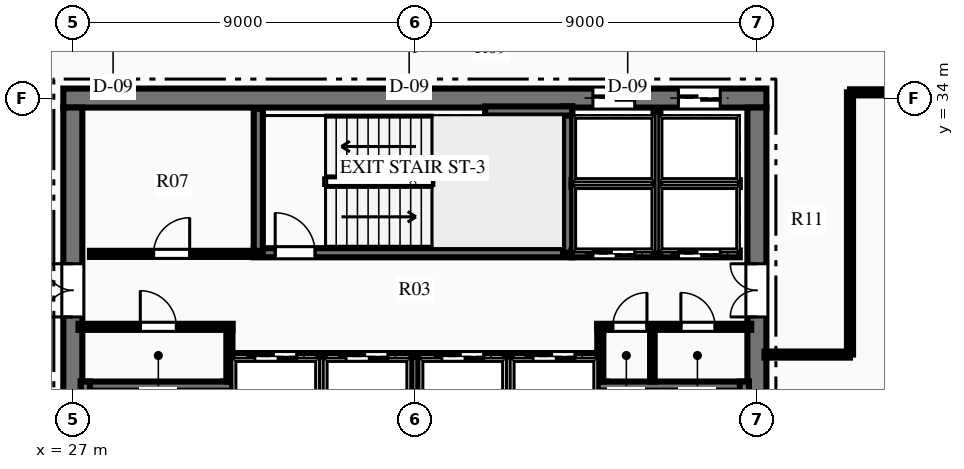
"""IFC4 building model, lengths in metres.
Left out: names, types, materials, properties, quantities, classifications, styles, units other than length and angle.
Written with IfcOpenShell. Run it as: python <this file> out.ifc"""

import sys

from ifc_helpers import new_model, si_unit, direction, frame, frame_2d, origin, place, context, subcontext, project, spatial, rectangle, extrude, element, fill, save


model = new_model("IFC4")
c1 = context("Model", 3, precision=1e-05, world=origin(), true_north=direction((0.0, 1.0)))
c2 = subcontext(c1, "Body", "Model", "MODEL_VIEW")
j1 = project(units=[si_unit("LENGTHUNIT", "METRE"), si_unit("PLANEANGLEUNIT", "RADIAN")], contexts=[c1])
p1 = place(None, origin())
s1 = spatial("IfcSite", under=j1, at=p1, CompositionType="ELEMENT")
p2 = place(p1, origin())
s2 = spatial("IfcBuilding", under=s1, at=p2, CompositionType="ELEMENT")
p3 = place(p2, frame((0.0, 0.0, 217.2)))
s3 = spatial("IfcBuildingStorey", under=s2, at=p3, CompositionType="ELEMENT", Elevation=217.2)
p4 = place(p3, frame((26.75, 34.0, 0.0), z_axis=(0.0, 0.0, 1.0), x_axis=(1.0, 0.0, 0.0)))
e1 = element("IfcWall", 1, at=p4, inside=s3, PredefinedType="SHEAR", context=c2, shape_type="SweptSolid", body=[
    extrude(rectangle(XDim=18.5, YDim=0.5, at=frame_2d((9.25, 0.0))), origin(), (0.0, 0.0, 1.0), 3.75),
])
p5 = place(p4, frame((13.935, 0.0, 0.0)))
e2 = element("IfcOpeningElement", 2, at=p5, cuts=e1, PredefinedType="OPENING", context=c2, shape_type="SweptSolid", body=[
    extrude(rectangle(XDim=1.1, YDim=2.15, at=frame_2d((0.55, 1.075))), frame((0.0, 0.26, 0.0), z_axis=(0.0, -1.0, 0.0), x_axis=(1.0, 0.0, 0.0)), (0.0, 0.0, 1.0), 0.52),
])
p6 = place(p4, frame((16.185, 0.0, 0.0)))
e3 = element("IfcOpeningElement", 3, at=p6, cuts=e1, PredefinedType="OPENING", context=c2, shape_type="SweptSolid", body=[
    extrude(rectangle(XDim=1.1, YDim=2.15, at=frame_2d((0.55, 1.075))), frame((0.0, 0.26, 0.0), z_axis=(0.0, -1.0, 0.0), x_axis=(1.0, 0.0, 0.0)), (0.0, 0.0, 1.0), 0.52),
])
p7 = place(p3, frame((27.0, 18.25, 0.0), z_axis=(0.0, 0.0, 1.0), x_axis=(0.0, 1.0, 0.0)))
e4 = element("IfcWall", 4, at=p7, inside=s3, PredefinedType="SHEAR", context=c2, shape_type="SweptSolid", body=[
    extrude(rectangle(XDim=15.5, YDim=0.5, at=frame_2d((7.75, 0.0))), origin(), (0.0, 0.0, 1.0), 3.75),
])
p8 = place(p7, frame((9.99, 0.0, 0.0)))
e5 = element("IfcOpeningElement", 5, at=p8, cuts=e4, PredefinedType="OPENING", context=c2, shape_type="SweptSolid", body=[
    extrude(rectangle(XDim=1.4, YDim=2.2, at=frame_2d((0.7, 1.1))), frame((0.0, 0.26, 0.0), z_axis=(0.0, -1.0, 0.0), x_axis=(1.0, 0.0, 0.0)), (0.0, 0.0, 1.0), 0.52),
])
p9 = place(p3, frame((45.0, 18.25, 0.0), z_axis=(0.0, 0.0, 1.0), x_axis=(0.0, 1.0, 0.0)))
e6 = element("IfcWall", 6, at=p9, inside=s3, PredefinedType="SHEAR", context=c2, shape_type="SweptSolid", body=[
    extrude(rectangle(XDim=15.5, YDim=0.5, at=frame_2d((7.75, 0.0))), origin(), (0.0, 0.0, 1.0), 3.75),
])
p10 = place(p9, frame((9.99, 0.0, 0.0)))
e7 = element("IfcOpeningElement", 7, at=p10, cuts=e6, PredefinedType="OPENING", context=c2, shape_type="SweptSolid", body=[
    extrude(rectangle(XDim=1.4, YDim=2.2, at=frame_2d((0.7, 1.1))), frame((0.0, 0.26, 0.0), z_axis=(0.0, -1.0, 0.0), x_axis=(1.0, 0.0, 0.0)), (0.0, 0.0, 1.0), 0.52),
])
p11 = place(p3, frame((31.07, 18.28, 0.0), z_axis=(0.0, 0.0, 1.0), x_axis=(0.0, 1.0, 0.0)))
e8 = element("IfcWall", 8, at=p11, inside=s3, PredefinedType="SHEAR", context=c2, shape_type="SweptSolid", body=[
    extrude(rectangle(XDim=8.26, YDim=0.24, at=frame_2d((4.13, 0.0))), origin(), (0.0, 0.0, 1.0), 3.75),
])
p12 = place(p11, frame((0.365, 0.0, 0.0)))
e9 = element("IfcOpeningElement", 9, at=p12, cuts=e8, PredefinedType="OPENING", context=c2, shape_type="SweptSolid", body=[
    extrude(rectangle(XDim=1.05, YDim=2.15, at=frame_2d((0.525, 1.075))), frame((0.0, 0.13, 0.0), z_axis=(0.0, -1.0, 0.0), x_axis=(1.0, 0.0, 0.0)), (0.0, 0.0, 1.0), 0.26),
])
p13 = place(p3, frame((27.21, 26.42, 0.0), z_axis=(0.0, 0.0, 1.0), x_axis=(1.0, 0.0, 0.0)))
e10 = element("IfcWall", 10, at=p13, inside=s3, PredefinedType="SHEAR", context=c2, shape_type="SweptSolid", body=[
    extrude(rectangle(XDim=3.98, YDim=0.24, at=frame_2d((1.99, 0.0))), origin(), (0.0, 0.0, 1.0), 3.75),
])
p14 = place(p3, frame((27.33, 18.28, 0.0), z_axis=(0.0, 0.0, 1.0), x_axis=(0.0, 1.0, 0.0)))
e11 = element("IfcWall", 11, at=p14, inside=s3, PredefinedType="SHEAR", context=c2, shape_type="SweptSolid", body=[
    extrude(rectangle(XDim=8.26, YDim=0.24, at=frame_2d((4.13, 0.0))), origin(), (0.0, 0.0, 1.0), 3.75),
])
p15 = place(p3, frame((40.93, 18.28, 0.0), z_axis=(0.0, 0.0, 1.0), x_axis=(0.0, 1.0, 0.0)))
e12 = element("IfcWall", 12, at=p15, inside=s3, PredefinedType="SHEAR", context=c2, shape_type="SweptSolid", body=[
    extrude(rectangle(XDim=8.26, YDim=0.24, at=frame_2d((4.13, 0.0))), origin(), (0.0, 0.0, 1.0), 3.75),
])
p16 = place(p15, frame((0.365, 0.0, 0.0)))
e13 = element("IfcOpeningElement", 13, at=p16, cuts=e12, PredefinedType="OPENING", context=c2, shape_type="SweptSolid", body=[
    extrude(rectangle(XDim=1.05, YDim=2.15, at=frame_2d((0.525, 1.075))), frame((0.0, 0.13, 0.0), z_axis=(0.0, -1.0, 0.0), x_axis=(1.0, 0.0, 0.0)), (0.0, 0.0, 1.0), 0.26),
])
p17 = place(p3, frame((40.81, 26.42, 0.0), z_axis=(0.0, 0.0, 1.0), x_axis=(1.0, 0.0, 0.0)))
e14 = element("IfcWall", 14, at=p17, inside=s3, PredefinedType="SHEAR", context=c2, shape_type="SweptSolid", body=[
    extrude(rectangle(XDim=3.98, YDim=0.24, at=frame_2d((1.99, 0.0))), origin(), (0.0, 0.0, 1.0), 3.75),
])
p18 = place(p3, frame((44.67, 18.28, 0.0), z_axis=(0.0, 0.0, 1.0), x_axis=(0.0, 1.0, 0.0)))
e15 = element("IfcWall", 15, at=p18, inside=s3, PredefinedType="SHEAR", context=c2, shape_type="SweptSolid", body=[
    extrude(rectangle(XDim=8.26, YDim=0.24, at=frame_2d((4.13, 0.0))), origin(), (0.0, 0.0, 1.0), 3.75),
])
p19 = place(p3, frame((31.76, 29.93, 0.0), z_axis=(0.0, 0.0, 1.0), x_axis=(1.0, 0.0, 0.0)))
e16 = element("IfcWall", 16, at=p19, inside=s3, PredefinedType="SHEAR", context=c2, shape_type="SweptSolid", body=[
    extrude(rectangle(XDim=8.38, YDim=0.24, at=frame_2d((4.19, 0.0))), origin(), (0.0, 0.0, 1.0), 3.75),
])
p20 = place(p19, frame((0.565, 0.0, 0.0)))
e17 = element("IfcOpeningElement", 17, at=p20, cuts=e16, PredefinedType="OPENING", context=c2, shape_type="SweptSolid", body=[
    extrude(rectangle(XDim=1.05, YDim=2.15, at=frame_2d((0.525, 1.075))), frame((0.0, 0.13, 0.0), z_axis=(0.0, -1.0, 0.0), x_axis=(1.0, 0.0, 0.0)), (0.0, 0.0, 1.0), 0.26),
])
p21 = place(p3, frame((31.88, 29.93, 0.0), z_axis=(0.0, 0.0, 1.0), x_axis=(0.0, 1.0, 0.0)))
e18 = element("IfcWall", 18, at=p21, inside=s3, PredefinedType="SHEAR", context=c2, shape_type="SweptSolid", body=[
    extrude(rectangle(XDim=3.79, YDim=0.24, at=frame_2d((1.895, 0.0))), origin(), (0.0, 0.0, 1.0), 3.75),
])
p22 = place(p3, frame((40.02, 29.93, 0.0), z_axis=(0.0, 0.0, 1.0), x_axis=(0.0, 1.0, 0.0)))
e19 = element("IfcWall", 19, at=p22, inside=s3, PredefinedType="SHEAR", context=c2, shape_type="SweptSolid", body=[
    extrude(rectangle(XDim=3.85, YDim=0.24, at=frame_2d((1.925, 0.0))), origin(), (0.0, 0.0, 1.0), 3.75),
])
p23 = place(p3, frame((37.85, 33.66, 0.0), z_axis=(0.0, 0.0, 1.0), x_axis=(1.0, 0.0, 0.0)))
e20 = element("IfcWall", 20, at=p23, inside=s3, PredefinedType="SHEAR", context=c2, shape_type="SweptSolid", body=[
    extrude(rectangle(XDim=2.29, YDim=0.24, at=frame_2d((1.145, 0.0))), origin(), (0.0, 0.0, 1.0), 3.75),
])
p24 = place(p3, frame((27.15, 27.98, 0.0), z_axis=(0.0, 0.0, 1.0), x_axis=(1.0, 0.0, 0.0)))
e21 = element("IfcWall", 21, at=p24, inside=s3, PredefinedType="PARTITIONING", context=c2, shape_type="SweptSolid", body=[
    extrude(rectangle(XDim=4.05, YDim=0.16, at=frame_2d((2.025, 0.0))), origin(), (0.0, 0.0, 1.0), 3.47),
])
p25 = place(p24, frame((1.625, 0.0, 0.0)))
e22 = element("IfcOpeningElement", 22, at=p25, cuts=e21, PredefinedType="OPENING", context=c2, shape_type="SweptSolid", body=[
    extrude(rectangle(XDim=0.95, YDim=2.15, at=frame_2d((0.475, 1.075))), frame((0.0, 0.09, 0.0), z_axis=(0.0, -1.0, 0.0), x_axis=(1.0, 0.0, 0.0)), (0.0, 0.0, 1.0), 0.18),
])
p26 = place(p3, frame((31.12, 26.54, 0.0), z_axis=(0.0, 0.0, 1.0), x_axis=(0.0, 1.0, 0.0)))
e23 = element("IfcWall", 23, at=p26, inside=s3, PredefinedType="PARTITIONING", context=c2, shape_type="SweptSolid", body=[
    extrude(rectangle(XDim=1.51, YDim=0.16, at=frame_2d((0.755, 0.0))), origin(), (0.0, 0.0, 1.0), 3.47),
])
p27 = place(p3, frame((40.8, 27.98, 0.0), z_axis=(0.0, 0.0, 1.0), x_axis=(1.0, 0.0, 0.0)))
e24 = element("IfcWall", 24, at=p27, inside=s3, PredefinedType="PARTITIONING", context=c2, shape_type="SweptSolid", body=[
    extrude(rectangle(XDim=4.05, YDim=0.16, at=frame_2d((2.025, 0.0))), origin(), (0.0, 0.0, 1.0), 3.47),
])
p28 = place(p27, frame((0.407, 0.0, 0.0)))
e25 = element("IfcOpeningElement", 25, at=p28, cuts=e24, PredefinedType="OPENING", context=c2, shape_type="SweptSolid", body=[
    extrude(rectangle(XDim=0.9, YDim=2.15, at=frame_2d((0.45, 1.075))), frame((0.0, 0.09, 0.0), z_axis=(0.0, -1.0, 0.0), x_axis=(1.0, 0.0, 0.0)), (0.0, 0.0, 1.0), 0.18),
])
p29 = place(p27, frame((2.2, 0.0, 0.0)))
e26 = element("IfcOpeningElement", 26, at=p29, cuts=e24, PredefinedType="OPENING", context=c2, shape_type="SweptSolid", body=[
    extrude(rectangle(XDim=0.9, YDim=2.15, at=frame_2d((0.45, 1.075))), frame((0.0, 0.09, 0.0), z_axis=(0.0, -1.0, 0.0), x_axis=(1.0, 0.0, 0.0)), (0.0, 0.0, 1.0), 0.18),
])
p30 = place(p3, frame((40.88, 26.54, 0.0), z_axis=(0.0, 0.0, 1.0), x_axis=(0.0, 1.0, 0.0)))
e27 = element("IfcWall", 27, at=p30, inside=s3, PredefinedType="PARTITIONING", context=c2, shape_type="SweptSolid", body=[
    extrude(rectangle(XDim=1.51, YDim=0.16, at=frame_2d((0.755, 0.0))), origin(), (0.0, 0.0, 1.0), 3.47),
])
p31 = place(p3, frame((42.25, 26.54, 0.0), z_axis=(0.0, 0.0, 1.0), x_axis=(0.0, 1.0, 0.0)))
e28 = element("IfcWall", 28, at=p31, inside=s3, PredefinedType="PARTITIONING", context=c2, shape_type="SweptSolid", body=[
    extrude(rectangle(XDim=1.44, YDim=0.12, at=frame_2d((0.72, 0.0))), origin(), (0.0, 0.0, 1.0), 3.47),
])
p32 = place(p3, frame((27.45, 29.9, 0.0), z_axis=(0.0, 0.0, 1.0), x_axis=(1.0, 0.0, 0.0)))
e29 = element("IfcWall", 29, at=p32, inside=s3, PredefinedType="PARTITIONING", context=c2, shape_type="SweptSolid", body=[
    extrude(rectangle(XDim=4.43, YDim=0.16, at=frame_2d((2.215, 0.0))), origin(), (0.0, 0.0, 1.0), 3.47),
])
p33 = place(p32, frame((1.675, 0.0, 0.0)))
e30 = element("IfcOpeningElement", 30, at=p33, cuts=e29, PredefinedType="OPENING", context=c2, shape_type="SweptSolid", body=[
    extrude(rectangle(XDim=0.95, YDim=2.15, at=frame_2d((0.475, 1.075))), frame((0.0, 0.09, 0.0), z_axis=(0.0, -1.0, 0.0), x_axis=(1.0, 0.0, 0.0)), (0.0, 0.0, 1.0), 0.18),
])
p34 = place(p3, frame((40.12, 29.9, 0.0), z_axis=(0.0, 0.0, 1.0), x_axis=(1.0, 0.0, 0.0)))
e31 = element("IfcWall", 31, at=p34, inside=s3, PredefinedType="PARTITIONING", context=c2, shape_type="SweptSolid", body=[
    extrude(rectangle(XDim=4.43, YDim=0.18, at=frame_2d((2.215, 0.0))), origin(), (0.0, 0.0, 1.0), 3.47),
])
p35 = place(p34, frame((0.565, 0.0, 0.0)))
e32 = element("IfcOpeningElement", 32, at=p35, cuts=e31, PredefinedType="OPENING", context=c2, shape_type="SweptSolid", body=[
    extrude(rectangle(XDim=1.1, YDim=2.15, at=frame_2d((0.55, 1.075))), frame((0.0, 0.1, 0.0), z_axis=(0.0, -1.0, 0.0), x_axis=(1.0, 0.0, 0.0)), (0.0, 0.0, 1.0), 0.2),
])
p36 = place(p34, frame((2.815, 0.0, 0.0)))
e33 = element("IfcOpeningElement", 33, at=p36, cuts=e31, PredefinedType="OPENING", context=c2, shape_type="SweptSolid", body=[
    extrude(rectangle(XDim=1.1, YDim=2.15, at=frame_2d((0.55, 1.075))), frame((0.0, 0.1, 0.0), z_axis=(0.0, -1.0, 0.0), x_axis=(1.0, 0.0, 0.0)), (0.0, 0.0, 1.0), 0.2),
])
p37 = place(p3, frame((40.12, 31.75, 0.0), z_axis=(0.0, 0.0, 1.0), x_axis=(1.0, 0.0, 0.0)))
e34 = element("IfcWall", 34, at=p37, inside=s3, PredefinedType="PARTITIONING", context=c2, shape_type="SweptSolid", body=[
    extrude(rectangle(XDim=4.43, YDim=0.18, at=frame_2d((2.215, 0.0))), origin(), (0.0, 0.0, 1.0), 3.47),
])
p38 = place(p3, frame((42.37, 29.9, 0.0), z_axis=(0.0, 0.0, 1.0), x_axis=(0.0, 1.0, 0.0)))
e35 = element("IfcWall", 35, at=p38, inside=s3, PredefinedType="PARTITIONING", context=c2, shape_type="SweptSolid", body=[
    extrude(rectangle(XDim=3.75, YDim=0.18, at=frame_2d((1.875, 0.0))), origin(), (0.0, 0.0, 1.0), 3.47),
])
p39 = place(p3, frame((31.2, 27.2, 0.0), z_axis=(0.0, 0.0, 1.0), x_axis=(1.0, 0.0, 0.0)))
e36 = element("IfcWall", 36, at=p39, inside=s3, PredefinedType="PARTITIONING", context=c2, shape_type="SweptSolid", body=[
    extrude(rectangle(XDim=9.6, YDim=0.18, at=frame_2d((4.8, 0.0))), origin(), (0.0, 0.0, 1.0), 3.47),
])
p40 = place(p39, frame((0.59, 0.0, 0.0)))
e37 = element("IfcOpeningElement", 37, at=p40, cuts=e36, PredefinedType="OPENING", context=c2, shape_type="SweptSolid", body=[
    extrude(rectangle(XDim=1.1, YDim=2.15, at=frame_2d((0.55, 1.075))), frame((0.0, 0.1, 0.0), z_axis=(0.0, -1.0, 0.0), x_axis=(1.0, 0.0, 0.0)), (0.0, 0.0, 1.0), 0.2),
])
p41 = place(p39, frame((2.99, 0.0, 0.0)))
e38 = element("IfcOpeningElement", 38, at=p41, cuts=e36, PredefinedType="OPENING", context=c2, shape_type="SweptSolid", body=[
    extrude(rectangle(XDim=1.1, YDim=2.15, at=frame_2d((0.55, 1.075))), frame((0.0, 0.1, 0.0), z_axis=(0.0, -1.0, 0.0), x_axis=(1.0, 0.0, 0.0)), (0.0, 0.0, 1.0), 0.2),
])
p42 = place(p39, frame((5.51, 0.0, 0.0)))
e39 = element("IfcOpeningElement", 39, at=p42, cuts=e36, PredefinedType="OPENING", context=c2, shape_type="SweptSolid", body=[
    extrude(rectangle(XDim=1.1, YDim=2.15, at=frame_2d((0.55, 1.075))), frame((0.0, 0.1, 0.0), z_axis=(0.0, -1.0, 0.0), x_axis=(1.0, 0.0, 0.0)), (0.0, 0.0, 1.0), 0.2),
])
p43 = place(p39, frame((7.91, 0.0, 0.0)))
e40 = element("IfcOpeningElement", 40, at=p43, cuts=e36, PredefinedType="OPENING", context=c2, shape_type="SweptSolid", body=[
    extrude(rectangle(XDim=1.1, YDim=2.15, at=frame_2d((0.55, 1.075))), frame((0.0, 0.1, 0.0), z_axis=(0.0, -1.0, 0.0), x_axis=(1.0, 0.0, 0.0)), (0.0, 0.0, 1.0), 0.2),
])
for number, where, z_axis, x_axis in (
    (41, (33.54, 25.3, 0.0), (0.0, 0.0, 1.0), (0.0, 1.0, 0.0)),
    (42, (36.0, 25.3, 0.0), (0.0, 0.0, 1.0), (0.0, 1.0, 0.0)),
    (43, (38.46, 25.3, 0.0), (0.0, 0.0, 1.0), (0.0, 1.0, 0.0)),
):
    element("IfcWall", number, at=place(p3, frame(where, z_axis=z_axis, x_axis=x_axis)), inside=s3, PredefinedType="PARTITIONING", context=c2, shape_type="SweptSolid", body=[
        extrude(rectangle(XDim=1.9, YDim=0.18, at=frame_2d((0.95, 0.0))), origin(), (0.0, 0.0, 1.0), 3.47),
    ])
p44 = place(p3, frame((47.45, 34.15, 0.0), z_axis=(0.0, 0.0, 1.0), x_axis=(1.0, 0.0, 0.0)))
e44 = element("IfcWall", 44, at=p44, inside=s3, PredefinedType="PARTITIONING", context=c2, shape_type="SweptSolid", body=[
    extrude(rectangle(XDim=6.35, YDim=0.16, at=frame_2d((3.175, 0.0))), origin(), (0.0, 0.0, 1.0), 3.47),
])
p45 = place(p3, frame((47.45, 27.25, 0.0), z_axis=(0.0, 0.0, 1.0), x_axis=(0.0, 1.0, 0.0)))
e45 = element("IfcWall", 45, at=p45, inside=s3, PredefinedType="PARTITIONING", context=c2, shape_type="SweptSolid", body=[
    extrude(rectangle(XDim=6.9, YDim=0.16, at=frame_2d((3.45, 0.0))), origin(), (0.0, 0.0, 1.0), 3.47),
])
p46 = place(p3, frame((45.2, 27.25, 0.0), z_axis=(0.0, 0.0, 1.0), x_axis=(1.0, 0.0, 0.0)))
e46 = element("IfcWall", 46, at=p46, inside=s3, PredefinedType="PARTITIONING", context=c2, shape_type="SweptSolid", body=[
    extrude(rectangle(XDim=2.25, YDim=0.16, at=frame_2d((1.125, 0.0))), origin(), (0.0, 0.0, 1.0), 3.47),
])
p47 = place(p25, origin())
e47 = element("IfcDoor", 47, at=p47, inside=s3, OperationType="SINGLE_SWING_LEFT", PredefinedType="DOOR", context=c2, shape_type="SweptSolid", body=[
    extrude(rectangle(XDim=0.95, YDim=2.15, at=frame_2d((0.475, 1.075))), frame((0.0, 0.025, 0.0), z_axis=(0.0, -1.0, 0.0), x_axis=(1.0, 0.0, 0.0)), (0.0, 0.0, 1.0), 0.05),
])
fill(e22, e47)
p48 = place(p28, origin())
e48 = element("IfcDoor", 48, at=p48, inside=s3, OperationType="SINGLE_SWING_RIGHT", PredefinedType="DOOR", context=c2, shape_type="SweptSolid", body=[
    extrude(rectangle(XDim=0.9, YDim=2.15, at=frame_2d((0.45, 1.075))), frame((0.0, 0.025, 0.0), z_axis=(0.0, -1.0, 0.0), x_axis=(1.0, 0.0, 0.0)), (0.0, 0.0, 1.0), 0.05),
])
fill(e25, e48)
p49 = place(p29, origin())
e49 = element("IfcDoor", 49, at=p49, inside=s3, OperationType="SINGLE_SWING_LEFT", PredefinedType="DOOR", context=c2, shape_type="SweptSolid", body=[
    extrude(rectangle(XDim=0.9, YDim=2.15, at=frame_2d((0.45, 1.075))), frame((0.0, 0.025, 0.0), z_axis=(0.0, -1.0, 0.0), x_axis=(1.0, 0.0, 0.0)), (0.0, 0.0, 1.0), 0.05),
])
fill(e26, e49)
p50 = place(p33, origin())
e50 = element("IfcDoor", 50, at=p50, inside=s3, OperationType="SINGLE_SWING_RIGHT", PredefinedType="DOOR", context=c2, shape_type="SweptSolid", body=[
    extrude(rectangle(XDim=0.95, YDim=2.15, at=frame_2d((0.475, 1.075))), frame((0.0, 0.025, 0.0), z_axis=(0.0, -1.0, 0.0), x_axis=(1.0, 0.0, 0.0)), (0.0, 0.0, 1.0), 0.05),
])
fill(e30, e50)
p51 = place(p20, origin())
e51 = element("IfcDoor", 51, at=p51, inside=s3, OperationType="SINGLE_SWING_LEFT", PredefinedType="DOOR", context=c2, shape_type="SweptSolid", body=[
    extrude(rectangle(XDim=1.05, YDim=2.15, at=frame_2d((0.525, 1.075))), frame((0.0, 0.025, 0.0), z_axis=(0.0, -1.0, 0.0), x_axis=(1.0, 0.0, 0.0)), (0.0, 0.0, 1.0), 0.05),
])
fill(e17, e51)
p52 = place(p8, origin())
e52 = element("IfcDoor", 52, at=p52, inside=s3, OperationType="DOUBLE_DOOR_SINGLE_SWING", PredefinedType="DOOR", context=c2, shape_type="SweptSolid", body=[
    extrude(rectangle(XDim=1.4, YDim=2.2, at=frame_2d((0.7, 1.1))), frame((0.0, 0.025, 0.0), z_axis=(0.0, -1.0, 0.0), x_axis=(1.0, 0.0, 0.0)), (0.0, 0.0, 1.0), 0.05),
])
fill(e5, e52)
p53 = place(p10, origin())
e53 = element("IfcDoor", 53, at=p53, inside=s3, OperationType="DOUBLE_DOOR_SINGLE_SWING", PredefinedType="DOOR", context=c2, shape_type="SweptSolid", body=[
    extrude(rectangle(XDim=1.4, YDim=2.2, at=frame_2d((0.7, 1.1))), frame((0.0, 0.025, 0.0), z_axis=(0.0, -1.0, 0.0), x_axis=(1.0, 0.0, 0.0)), (0.0, 0.0, 1.0), 0.05),
])
fill(e7, e53)
p54 = place(p35, origin())
e54 = element("IfcDoor", 54, at=p54, inside=s3, OperationType="SLIDING_TO_LEFT", PredefinedType="DOOR", context=c2, shape_type="SweptSolid", body=[
    extrude(rectangle(XDim=1.1, YDim=2.15, at=frame_2d((0.55, 1.075))), frame((0.0, 0.025, 0.0), z_axis=(0.0, -1.0, 0.0), x_axis=(1.0, 0.0, 0.0)), (0.0, 0.0, 1.0), 0.05),
])
fill(e32, e54)
p55 = place(p36, origin())
e55 = element("IfcDoor", 55, at=p55, inside=s3, OperationType="SLIDING_TO_LEFT", PredefinedType="DOOR", context=c2, shape_type="SweptSolid", body=[
    extrude(rectangle(XDim=1.1, YDim=2.15, at=frame_2d((0.55, 1.075))), frame((0.0, 0.025, 0.0), z_axis=(0.0, -1.0, 0.0), x_axis=(1.0, 0.0, 0.0)), (0.0, 0.0, 1.0), 0.05),
])
fill(e33, e55)
p56 = place(p5, origin())
e56 = element("IfcDoor", 56, at=p56, inside=s3, OperationType="SLIDING_TO_LEFT", PredefinedType="DOOR", context=c2, shape_type="SweptSolid", body=[
    extrude(rectangle(XDim=1.1, YDim=2.15, at=frame_2d((0.55, 1.075))), frame((0.0, 0.025, 0.0), z_axis=(0.0, -1.0, 0.0), x_axis=(1.0, 0.0, 0.0)), (0.0, 0.0, 1.0), 0.05),
])
fill(e2, e56)
p57 = place(p6, origin())
e57 = element("IfcDoor", 57, at=p57, inside=s3, OperationType="SLIDING_TO_LEFT", PredefinedType="DOOR", context=c2, shape_type="SweptSolid", body=[
    extrude(rectangle(XDim=1.1, YDim=2.15, at=frame_2d((0.55, 1.075))), frame((0.0, 0.025, 0.0), z_axis=(0.0, -1.0, 0.0), x_axis=(1.0, 0.0, 0.0)), (0.0, 0.0, 1.0), 0.05),
])
fill(e3, e57)
p58 = place(p40, origin())
e58 = element("IfcDoor", 58, at=p58, inside=s3, OperationType="SLIDING_TO_LEFT", PredefinedType="DOOR", context=c2, shape_type="SweptSolid", body=[
    extrude(rectangle(XDim=1.1, YDim=2.15, at=frame_2d((0.55, 1.075))), frame((0.0, 0.025, 0.0), z_axis=(0.0, -1.0, 0.0), x_axis=(1.0, 0.0, 0.0)), (0.0, 0.0, 1.0), 0.05),
])
fill(e37, e58)
p59 = place(p41, origin())
e59 = element("IfcDoor", 59, at=p59, inside=s3, OperationType="SLIDING_TO_LEFT", PredefinedType="DOOR", context=c2, shape_type="SweptSolid", body=[
    extrude(rectangle(XDim=1.1, YDim=2.15, at=frame_2d((0.55, 1.075))), frame((0.0, 0.025, 0.0), z_axis=(0.0, -1.0, 0.0), x_axis=(1.0, 0.0, 0.0)), (0.0, 0.0, 1.0), 0.05),
])
fill(e38, e59)
p60 = place(p42, origin())
e60 = element("IfcDoor", 60, at=p60, inside=s3, OperationType="SLIDING_TO_LEFT", PredefinedType="DOOR", context=c2, shape_type="SweptSolid", body=[
    extrude(rectangle(XDim=1.1, YDim=2.15, at=frame_2d((0.55, 1.075))), frame((0.0, 0.025, 0.0), z_axis=(0.0, -1.0, 0.0), x_axis=(1.0, 0.0, 0.0)), (0.0, 0.0, 1.0), 0.05),
])
fill(e39, e60)
p61 = place(p43, origin())
e61 = element("IfcDoor", 61, at=p61, inside=s3, OperationType="SLIDING_TO_LEFT", PredefinedType="DOOR", context=c2, shape_type="SweptSolid", body=[
    extrude(rectangle(XDim=1.1, YDim=2.15, at=frame_2d((0.55, 1.075))), frame((0.0, 0.025, 0.0), z_axis=(0.0, -1.0, 0.0), x_axis=(1.0, 0.0, 0.0)), (0.0, 0.0, 1.0), 0.05),
])
fill(e40, e61)
save(model, sys.argv[1])
